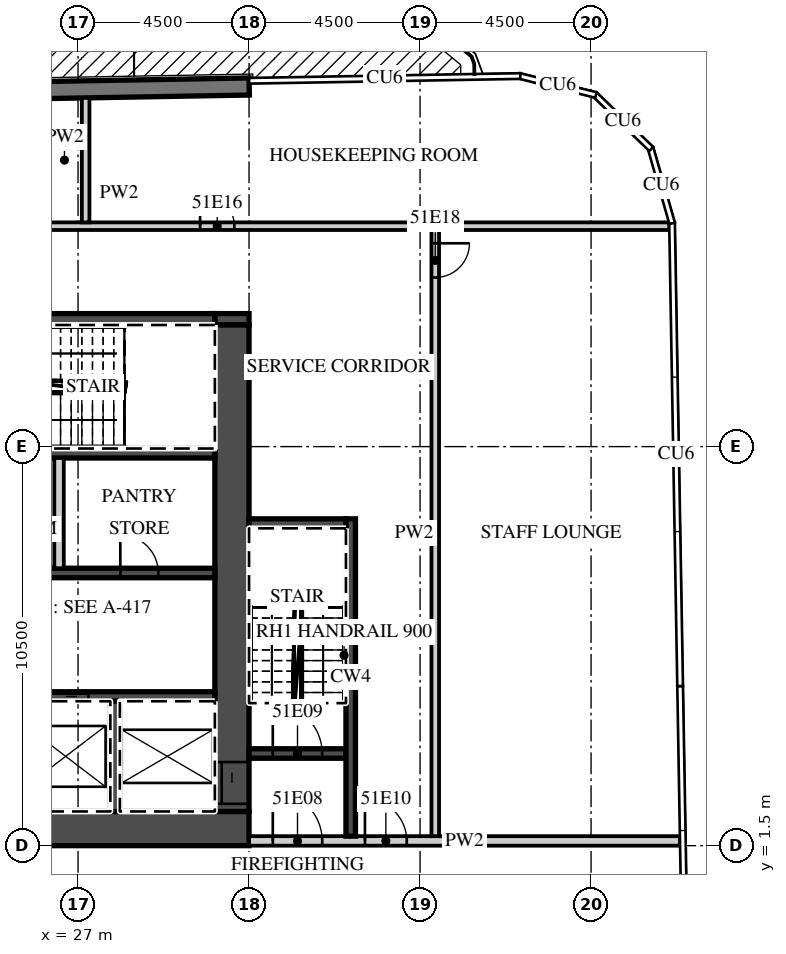
"""IFC4 building model, lengths in metres.
Left out: names, types, materials, properties, quantities, classifications, styles, units other than length and angle.
Written with IfcOpenShell. Run it as: python <this file> out.ifc"""

import sys

from ifc_helpers import new_model, si_unit, direction, frame, frame_2d, origin, place, context, subcontext, project, spatial, rectangle, extrude, element, fill, save


model = new_model("IFC4")
c1 = context("Model", 3, precision=1e-05, world=origin(), true_north=direction((0.0, 1.0)))
c2 = subcontext(c1, "Body", "Model", "MODEL_VIEW")
j1 = project(units=[si_unit("LENGTHUNIT", "METRE"), si_unit("PLANEANGLEUNIT", "RADIAN")], contexts=[c1])
p1 = place(None, origin())
s1 = spatial("IfcSite", under=j1, at=p1, CompositionType="ELEMENT")
p2 = place(p1, origin())
s2 = spatial("IfcBuilding", under=s1, at=p2, CompositionType="ELEMENT")
p3 = place(p2, frame((0.0, 0.0, 211.1)))
s3 = spatial("IfcBuildingStorey", under=s2, at=p3, CompositionType="ELEMENT", Elevation=211.1)
p4 = place(p3, frame((31.504, 21.476, 0.0), z_axis=(0.0, 0.0, 1.0), x_axis=(-0.999847677887, -0.017453395744, 0.0)))
e1 = element("IfcWall", 1, at=p4, inside=s3, PredefinedType="SOLIDWALL", context=c2, shape_type="SweptSolid", body=[
    extrude(rectangle(XDim=18.003, YDim=0.45, at=frame_2d((9.001, 0.0))), origin(), (0.0, 0.0, 1.0), 6.32),
])
p5 = place(p3, frame((13.5, 1.95, 0.0), z_axis=(0.0, 0.0, 1.0), x_axis=(1.0, 0.0, 0.0)))
e2 = element("IfcWall", 2, at=p5, inside=s3, PredefinedType="SHEAR", context=c2, shape_type="SweptSolid", body=[
    extrude(rectangle(XDim=18.0, YDim=0.9, at=frame_2d((9.0, 0.0))), origin(), (0.0, 0.0, 1.0), 6.32),
])
p6 = place(p5, frame((1.475, 0.0, 0.0)))
e3 = element("IfcOpeningElement", 3, at=p6, cuts=e2, PredefinedType="OPENING", context=c2, shape_type="SweptSolid", body=[
    extrude(rectangle(XDim=1.8, YDim=2.1, at=frame_2d((0.9, 1.05))), frame((0.0, 0.46, 0.0), z_axis=(0.0, -1.0, 0.0), x_axis=(1.0, 0.0, 0.0)), (0.0, 0.0, 1.0), 0.92),
])
p7 = place(p3, frame((30.6, 15.35, 0.0), z_axis=(0.0, 0.0, 1.0), x_axis=(1.0, 0.0, 0.0)))
e4 = element("IfcWall", 4, at=p7, inside=s3, PredefinedType="SHEAR", context=c2, shape_type="SweptSolid", body=[
    extrude(rectangle(XDim=0.9, YDim=0.3, at=frame_2d((0.45, 0.0))), origin(), (0.0, 0.0, 1.0), 6.32),
])
p8 = place(p3, frame((20.3, 15.35, 0.0), z_axis=(0.0, 0.0, 1.0), x_axis=(1.0, 0.0, 0.0)))
e5 = element("IfcWall", 5, at=p8, inside=s3, PredefinedType="SHEAR", context=c2, shape_type="SweptSolid", body=[
    extrude(rectangle(XDim=10.3, YDim=0.3, at=frame_2d((5.15, 0.0))), origin(), (0.0, 0.0, 1.0), 6.32),
])
p9 = place(p8, frame((4.0, 0.0, 0.0)))
e6 = element("IfcOpeningElement", 6, at=p9, cuts=e5, PredefinedType="OPENING", context=c2, shape_type="SweptSolid", body=[
    extrude(rectangle(XDim=1.3, YDim=2.1, at=frame_2d((0.65, 1.05))), frame((0.0, 0.16, 0.0), z_axis=(0.0, -1.0, 0.0), x_axis=(1.0, 0.0, 0.0)), (0.0, 0.0, 1.0), 0.32),
])
p10 = place(p8, frame((2.087, 0.0, 0.0)))
e7 = element("IfcOpeningElement", 7, at=p10, cuts=e5, PredefinedType="OPENING", context=c2, shape_type="SweptSolid", body=[
    extrude(rectangle(XDim=0.9, YDim=2.1, at=frame_2d((0.45, 1.05))), frame((0.0, 0.16, 0.0), z_axis=(0.0, -1.0, 0.0), x_axis=(1.0, 0.0, 0.0)), (0.0, 0.0, 1.0), 0.32),
])
p11 = place(p3, frame((31.05, 2.4, 0.0), z_axis=(0.0, 0.0, 1.0), x_axis=(0.0, 1.0, 0.0)))
e8 = element("IfcWall", 8, at=p11, inside=s3, PredefinedType="SHEAR", context=c2, shape_type="SweptSolid", body=[
    extrude(rectangle(XDim=12.8, YDim=0.9, at=frame_2d((6.4, 0.0))), origin(), (0.0, 0.0, 1.0), 6.32),
])
p12 = place(p11, frame((0.2, 0.0, 0.0)))
e9 = element("IfcOpeningElement", 9, at=p12, cuts=e8, PredefinedType="OPENING", context=c2, shape_type="SweptSolid", body=[
    extrude(rectangle(XDim=1.1, YDim=2.1, at=frame_2d((0.55, 1.05))), frame((0.0, 0.46, 0.0), z_axis=(0.0, -1.0, 0.0), x_axis=(1.0, 0.0, 0.0)), (0.0, 0.0, 1.0), 0.92),
])
p13 = place(p3, frame((17.6, 5.425, 0.0), z_axis=(0.0, 0.0, 1.0), x_axis=(1.0, 0.0, 0.0)))
e10 = element("IfcWall", 10, at=p13, inside=s3, PredefinedType="SHEAR", context=c2, shape_type="SweptSolid", body=[
    extrude(rectangle(XDim=13.0, YDim=0.25, at=frame_2d((6.5, 0.0))), origin(), (0.0, 0.0, 1.0), 6.32),
])
p14 = place(p13, frame((8.475, 0.0, 0.0)))
e11 = element("IfcOpeningElement", 11, at=p14, cuts=e10, PredefinedType="OPENING", context=c2, shape_type="SweptSolid", body=[
    extrude(rectangle(XDim=1.2, YDim=2.1, at=frame_2d((0.6, 1.05))), frame((0.0, 0.135, 0.0), z_axis=(0.0, -1.0, 0.0), x_axis=(1.0, 0.0, 0.0)), (0.0, 0.0, 1.0), 0.27),
])
p15 = place(p13, frame((5.875, 0.0, 0.0)))
e12 = element("IfcOpeningElement", 12, at=p15, cuts=e10, PredefinedType="OPENING", context=c2, shape_type="SweptSolid", body=[
    extrude(rectangle(XDim=1.2, YDim=2.1, at=frame_2d((0.6, 1.05))), frame((0.0, 0.135, 0.0), z_axis=(0.0, -1.0, 0.0), x_axis=(1.0, 0.0, 0.0)), (0.0, 0.0, 1.0), 0.27),
])
p16 = place(p3, frame((27.975, 2.4, 0.0), z_axis=(0.0, 0.0, 1.0), x_axis=(0.0, 1.0, 0.0)))
e13 = element("IfcWall", 13, at=p16, inside=s3, PredefinedType="SHEAR", context=c2, shape_type="SweptSolid", body=[
    extrude(rectangle(XDim=2.9, YDim=0.25, at=frame_2d((1.45, 0.0))), origin(), (0.0, 0.0, 1.0), 6.32),
])
p17 = place(p3, frame((14.4, 8.675, 0.0), z_axis=(0.0, 0.0, 1.0), x_axis=(1.0, 0.0, 0.0)))
e14 = element("IfcWall", 14, at=p17, inside=s3, PredefinedType="SHEAR", context=c2, shape_type="SweptSolid", body=[
    extrude(rectangle(XDim=16.2, YDim=0.25, at=frame_2d((8.1, 0.0))), origin(), (0.0, 0.0, 1.0), 6.32),
])
p18 = place(p17, frame((6.45, 0.0, 0.0)))
e15 = element("IfcOpeningElement", 15, at=p18, cuts=e14, PredefinedType="OPENING", context=c2, shape_type="SweptSolid", body=[
    extrude(rectangle(XDim=1.2, YDim=2.1, at=frame_2d((0.6, 1.05))), frame((0.0, 0.135, 0.0), z_axis=(0.0, -1.0, 0.0), x_axis=(1.0, 0.0, 0.0)), (0.0, 0.0, 1.0), 0.27),
])
p19 = place(p17, frame((3.8, 0.0, 0.0)))
e16 = element("IfcOpeningElement", 16, at=p19, cuts=e14, PredefinedType="OPENING", context=c2, shape_type="SweptSolid", body=[
    extrude(rectangle(XDim=1.2, YDim=2.1, at=frame_2d((0.6, 1.05))), frame((0.0, 0.135, 0.0), z_axis=(0.0, -1.0, 0.0), x_axis=(1.0, 0.0, 0.0)), (0.0, 0.0, 1.0), 0.27),
])
p20 = place(p17, frame((0.65, 0.0, 0.0)))
e17 = element("IfcOpeningElement", 17, at=p20, cuts=e14, PredefinedType="OPENING", context=c2, shape_type="SweptSolid", body=[
    extrude(rectangle(XDim=1.3, YDim=2.1, at=frame_2d((0.65, 1.05))), frame((0.0, 0.135, 0.0), z_axis=(0.0, -1.0, 0.0), x_axis=(1.0, 0.0, 0.0)), (0.0, 0.0, 1.0), 0.27),
])
p21 = place(p17, frame((13.712, 0.0, 0.0)))
e18 = element("IfcOpeningElement", 18, at=p21, cuts=e14, PredefinedType="OPENING", context=c2, shape_type="SweptSolid", body=[
    extrude(rectangle(XDim=1.0, YDim=2.1, at=frame_2d((0.5, 1.05))), frame((0.0, 0.135, 0.0), z_axis=(0.0, -1.0, 0.0), x_axis=(1.0, 0.0, 0.0)), (0.0, 0.0, 1.0), 0.27),
])
p22 = place(p17, frame((9.738, 0.0, 0.0)))
e19 = element("IfcOpeningElement", 19, at=p22, cuts=e14, PredefinedType="OPENING", context=c2, shape_type="SweptSolid", body=[
    extrude(rectangle(XDim=1.0, YDim=2.1, at=frame_2d((0.5, 1.05))), frame((0.0, 0.135, 0.0), z_axis=(0.0, -1.0, 0.0), x_axis=(1.0, 0.0, 0.0)), (0.0, 0.0, 1.0), 0.27),
])
p23 = place(p3, frame((17.35, 11.825, 0.0), z_axis=(0.0, 0.0, 1.0), x_axis=(1.0, 0.0, 0.0)))
e20 = element("IfcWall", 20, at=p23, inside=s3, PredefinedType="SHEAR", context=c2, shape_type="SweptSolid", body=[
    extrude(rectangle(XDim=13.25, YDim=0.25, at=frame_2d((6.625, 0.0))), origin(), (0.0, 0.0, 1.0), 6.32),
])
p24 = place(p3, frame((26.5, 8.8, 0.0), z_axis=(0.0, 0.0, 1.0), x_axis=(0.0, 1.0, 0.0)))
e21 = element("IfcWall", 21, at=p24, inside=s3, PredefinedType="PARTITIONING", context=c2, shape_type="SweptSolid", body=[
    extrude(rectangle(XDim=2.9, YDim=0.25, at=frame_2d((1.45, 0.0))), origin(), (0.0, 0.0, 1.0), 6.32),
])
p25 = place(p3, frame((31.5, 1.625, 0.0), z_axis=(0.0, 0.0, 1.0), x_axis=(1.0, 0.0, 0.0)))
e22 = element("IfcWall", 22, at=p25, inside=s3, PredefinedType="PARTITIONING", context=c2, shape_type="SweptSolid", body=[
    extrude(rectangle(XDim=11.34, YDim=0.25, at=frame_2d((5.67, 0.0))), origin(), (0.0, 0.0, 1.0), 6.32),
])
p26 = place(p25, frame((0.625, 0.0, 0.0)))
e23 = element("IfcOpeningElement", 23, at=p26, cuts=e22, PredefinedType="OPENING", context=c2, shape_type="SweptSolid", body=[
    extrude(rectangle(XDim=1.3, YDim=2.1, at=frame_2d((0.65, 1.05))), frame((0.0, 0.135, 0.0), z_axis=(0.0, -1.0, 0.0), x_axis=(1.0, 0.0, 0.0)), (0.0, 0.0, 1.0), 0.27),
])
p27 = place(p25, frame((3.05, 0.0, 0.0)))
e24 = element("IfcOpeningElement", 24, at=p27, cuts=e22, PredefinedType="OPENING", context=c2, shape_type="SweptSolid", body=[
    extrude(rectangle(XDim=1.1, YDim=2.1, at=frame_2d((0.55, 1.05))), frame((0.0, 0.135, 0.0), z_axis=(0.0, -1.0, 0.0), x_axis=(1.0, 0.0, 0.0)), (0.0, 0.0, 1.0), 0.27),
])
p28 = place(p3, frame((31.5, 3.925, 0.0), z_axis=(0.0, 0.0, 1.0), x_axis=(1.0, 0.0, 0.0)))
e25 = element("IfcWall", 25, at=p28, inside=s3, PredefinedType="SHEAR", context=c2, shape_type="SweptSolid", body=[
    extrude(rectangle(XDim=2.55, YDim=0.25, at=frame_2d((1.275, 0.0))), origin(), (0.0, 0.0, 1.0), 6.32),
])
p29 = place(p28, frame((0.625, 0.0, 0.0)))
e26 = element("IfcOpeningElement", 26, at=p29, cuts=e25, PredefinedType="OPENING", context=c2, shape_type="SweptSolid", body=[
    extrude(rectangle(XDim=1.3, YDim=2.1, at=frame_2d((0.65, 1.05))), frame((0.0, 0.135, 0.0), z_axis=(0.0, -1.0, 0.0), x_axis=(1.0, 0.0, 0.0)), (0.0, 0.0, 1.0), 0.27),
])
p30 = place(p3, frame((34.175, 1.75, 0.0), z_axis=(0.0, 0.0, 1.0), x_axis=(0.0, 1.0, 0.0)))
e27 = element("IfcWall", 27, at=p30, inside=s3, PredefinedType="SHEAR", context=c2, shape_type="SweptSolid", body=[
    extrude(rectangle(XDim=8.35, YDim=0.25, at=frame_2d((4.175, 0.0))), origin(), (0.0, 0.0, 1.0), 6.32),
])
p31 = place(p3, frame((31.5, 9.975, 0.0), z_axis=(0.0, 0.0, 1.0), x_axis=(1.0, 0.0, 0.0)))
e28 = element("IfcWall", 28, at=p31, inside=s3, PredefinedType="SHEAR", context=c2, shape_type="SweptSolid", body=[
    extrude(rectangle(XDim=2.55, YDim=0.25, at=frame_2d((1.275, 0.0))), origin(), (0.0, 0.0, 1.0), 6.32),
])
p32 = place(p3, frame((36.4, 1.75, 0.0), z_axis=(0.0, 0.0, 1.0), x_axis=(0.0, 1.0, 0.0)))
e29 = element("IfcWall", 29, at=p32, inside=s3, PredefinedType="PARTITIONING", context=c2, shape_type="SweptSolid", body=[
    extrude(rectangle(XDim=15.95, YDim=0.2, at=frame_2d((7.975, 0.0))), origin(), (0.0, 0.0, 1.0), 6.32),
])
p33 = place(p32, frame((14.7, 0.0, 0.0)))
e30 = element("IfcOpeningElement", 30, at=p33, cuts=e29, PredefinedType="OPENING", context=c2, shape_type="SweptSolid", body=[
    extrude(rectangle(XDim=0.9, YDim=2.1, at=frame_2d((0.45, 1.05))), frame((0.0, 0.11, 0.0), z_axis=(0.0, -1.0, 0.0), x_axis=(1.0, 0.0, 0.0)), (0.0, 0.0, 1.0), 0.22),
])
p34 = place(p3, frame((13.6, 17.8, 0.0), z_axis=(0.0, 0.0, 1.0), x_axis=(1.0, 0.0, 0.0)))
e31 = element("IfcWall", 31, at=p34, inside=s3, PredefinedType="PARTITIONING", context=c2, shape_type="SweptSolid", body=[
    extrude(rectangle(XDim=28.958, YDim=0.2, at=frame_2d((14.479, 0.0))), origin(), (0.0, 0.0, 1.0), 6.32),
])
p35 = place(p34, frame((16.613, 0.0, 0.0)))
e32 = element("IfcOpeningElement", 32, at=p35, cuts=e31, PredefinedType="OPENING", context=c2, shape_type="SweptSolid", body=[
    extrude(rectangle(XDim=0.9, YDim=2.1, at=frame_2d((0.45, 1.05))), frame((0.0, 0.11, 0.0), z_axis=(0.0, -1.0, 0.0), x_axis=(1.0, 0.0, 0.0)), (0.0, 0.0, 1.0), 0.22),
])
p36 = place(p34, frame((8.312, 0.0, 0.0)))
e33 = element("IfcOpeningElement", 33, at=p36, cuts=e31, PredefinedType="OPENING", context=c2, shape_type="SweptSolid", body=[
    extrude(rectangle(XDim=0.9, YDim=2.1, at=frame_2d((0.45, 1.05))), frame((0.0, 0.11, 0.0), z_axis=(0.0, -1.0, 0.0), x_axis=(1.0, 0.0, 0.0)), (0.0, 0.0, 1.0), 0.22),
])
p37 = place(p3, frame((27.2, 17.9, 0.0), z_axis=(0.0, 0.0, 1.0), x_axis=(0.0, 1.0, 0.0)))
e34 = element("IfcWall", 34, at=p37, inside=s3, PredefinedType="PARTITIONING", context=c2, shape_type="SweptSolid", body=[
    extrude(rectangle(XDim=3.276, YDim=0.2, at=frame_2d((1.638, 0.0))), origin(), (0.0, 0.0, 1.0), 6.32),
])
p38 = place(p14, origin())
e35 = element("IfcDoor", 35, at=p38, inside=s3, OperationType="SLIDING_TO_LEFT", PredefinedType="DOOR", context=c2, shape_type="SweptSolid", body=[
    extrude(rectangle(XDim=1.2, YDim=2.1, at=frame_2d((0.6, 1.05))), frame((0.0, 0.025, 0.0), z_axis=(0.0, -1.0, 0.0), x_axis=(1.0, 0.0, 0.0)), (0.0, 0.0, 1.0), 0.05),
])
fill(e11, e35)
p39 = place(p12, origin())
e36 = element("IfcDoor", 36, at=p39, inside=s3, OperationType="SLIDING_TO_LEFT", PredefinedType="DOOR", context=c2, shape_type="SweptSolid", body=[
    extrude(rectangle(XDim=1.1, YDim=2.1, at=frame_2d((0.55, 1.05))), frame((0.0, 0.025, 0.0), z_axis=(0.0, -1.0, 0.0), x_axis=(1.0, 0.0, 0.0)), (0.0, 0.0, 1.0), 0.05),
])
fill(e9, e36)
p40 = place(p26, origin())
e37 = element("IfcDoor", 37, at=p40, inside=s3, OperationType="SINGLE_SWING_LEFT", PredefinedType="DOOR", context=c2, shape_type="SweptSolid", body=[
    extrude(rectangle(XDim=1.3, YDim=2.1, at=frame_2d((0.65, 1.05))), frame((0.0, 0.025, 0.0), z_axis=(0.0, -1.0, 0.0), x_axis=(1.0, 0.0, 0.0)), (0.0, 0.0, 1.0), 0.05),
])
fill(e23, e37)
p41 = place(p29, origin())
e38 = element("IfcDoor", 38, at=p41, inside=s3, OperationType="SINGLE_SWING_LEFT", PredefinedType="DOOR", context=c2, shape_type="SweptSolid", body=[
    extrude(rectangle(XDim=1.3, YDim=2.1, at=frame_2d((0.65, 1.05))), frame((0.0, 0.025, 0.0), z_axis=(0.0, -1.0, 0.0), x_axis=(1.0, 0.0, 0.0)), (0.0, 0.0, 1.0), 0.05),
])
fill(e26, e38)
p42 = place(p27, origin())
e39 = element("IfcDoor", 39, at=p42, inside=s3, OperationType="SINGLE_SWING_LEFT", PredefinedType="DOOR", context=c2, shape_type="SweptSolid", body=[
    extrude(rectangle(XDim=1.1, YDim=2.1, at=frame_2d((0.55, 1.05))), frame((0.0, 0.025, 0.0), z_axis=(0.0, -1.0, 0.0), x_axis=(1.0, 0.0, 0.0)), (0.0, 0.0, 1.0), 0.05),
])
fill(e24, e39)
p43 = place(p21, origin())
e40 = element("IfcDoor", 40, at=p43, inside=s3, OperationType="SINGLE_SWING_LEFT", PredefinedType="DOOR", context=c2, shape_type="SweptSolid", body=[
    extrude(rectangle(XDim=1.0, YDim=2.1, at=frame_2d((0.5, 1.05))), frame((0.0, 0.025, 0.0), z_axis=(0.0, -1.0, 0.0), x_axis=(1.0, 0.0, 0.0)), (0.0, 0.0, 1.0), 0.05),
])
fill(e18, e40)
p44 = place(p35, origin())
e41 = element("IfcDoor", 41, at=p44, inside=s3, OperationType="SINGLE_SWING_LEFT", PredefinedType="DOOR", context=c2, shape_type="SweptSolid", body=[
    extrude(rectangle(XDim=0.9, YDim=2.1, at=frame_2d((0.45, 1.05))), frame((0.0, 0.025, 0.0), z_axis=(0.0, -1.0, 0.0), x_axis=(1.0, 0.0, 0.0)), (0.0, 0.0, 1.0), 0.05),
])
fill(e32, e41)
p45 = place(p33, origin())
e42 = element("IfcDoor", 42, at=p45, inside=s3, OperationType="SINGLE_SWING_RIGHT", PredefinedType="DOOR", context=c2, shape_type="SweptSolid", body=[
    extrude(rectangle(XDim=0.9, YDim=2.1, at=frame_2d((0.45, 1.05))), frame((0.0, 0.025, 0.0), z_axis=(0.0, -1.0, 0.0), x_axis=(1.0, 0.0, 0.0)), (0.0, 0.0, 1.0), 0.05),
])
fill(e30, e42)
save(model, sys.argv[1])
